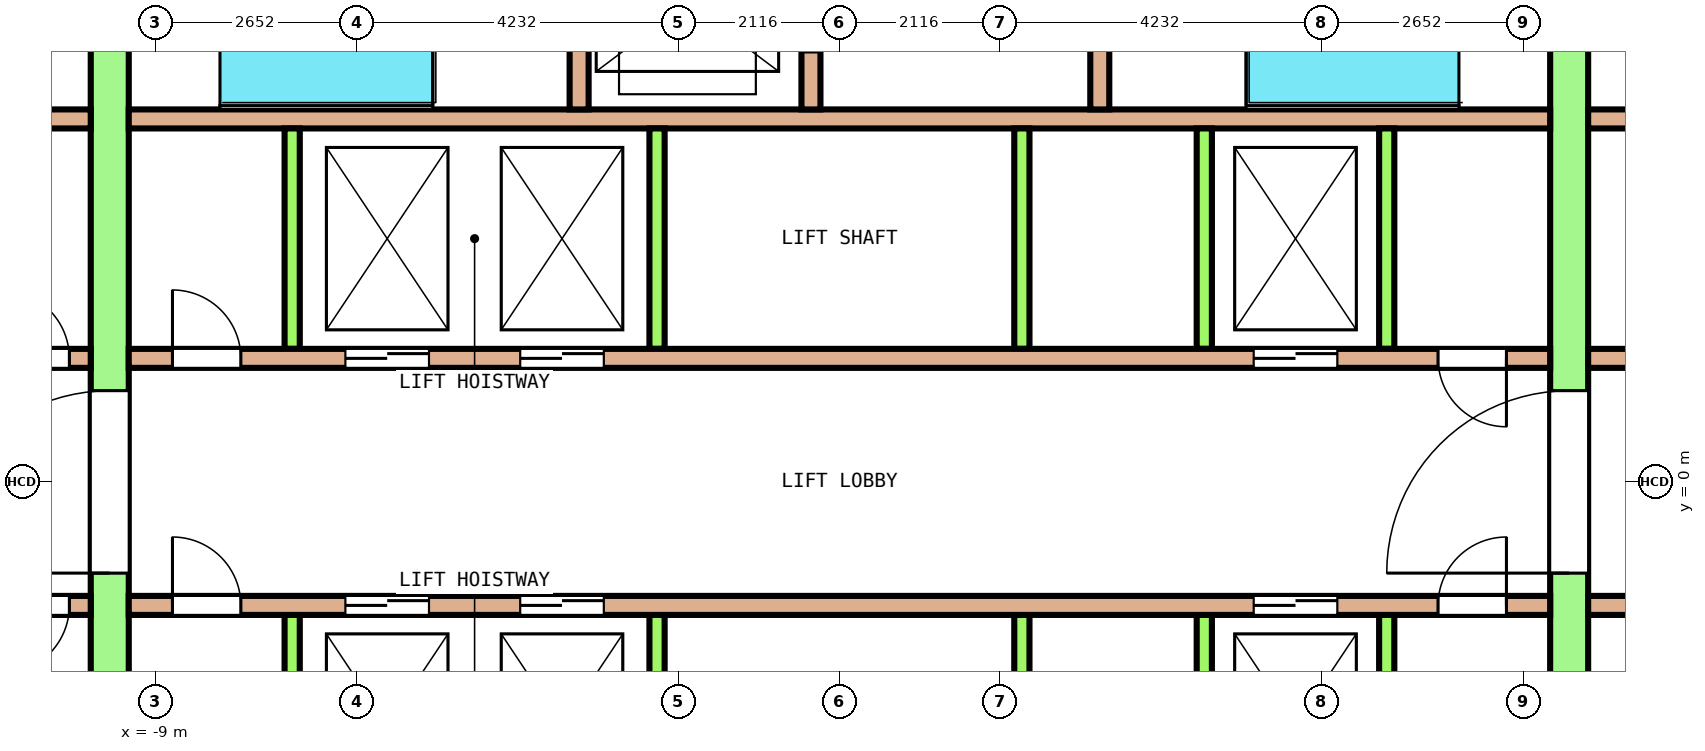
"""IFC4 building model, lengths in metres.
Left out: names, types, materials, properties, quantities, classifications, styles, units other than length and angle.
Written with IfcOpenShell. Run it as: python <this file> out.ifc"""

import sys

from ifc_helpers import new_model, si_unit, direction, frame, frame_2d, origin, place, context, subcontext, project, spatial, rectangle, extrude, element, fill, save


model = new_model("IFC4")
c1 = context("Model", 3, precision=1e-05, world=origin(), true_north=direction((0.0, 1.0)))
c2 = subcontext(c1, "Body", "Model", "MODEL_VIEW")
j1 = project(units=[si_unit("LENGTHUNIT", "METRE"), si_unit("PLANEANGLEUNIT", "RADIAN")], contexts=[c1])
p1 = place(None, origin())
s1 = spatial("IfcSite", under=j1, at=p1, CompositionType="ELEMENT")
p2 = place(p1, origin())
s2 = spatial("IfcBuilding", under=s1, at=p2, CompositionType="ELEMENT")
p3 = place(p2, frame((0.0, 0.0, 227.4)))
s3 = spatial("IfcBuildingStorey", under=s2, at=p3, CompositionType="ELEMENT", Elevation=227.4)
p4 = place(p3, frame((-9.6, -7.8, 0.0), z_axis=(0.0, 0.0, 1.0), x_axis=(0.0, 1.0, 0.0)))
e1 = element("IfcWall", 1, at=p4, inside=s3, PredefinedType="SHEAR", context=c2, shape_type="SweptSolid", body=[
    extrude(rectangle(XDim=15.6, YDim=0.5, at=frame_2d((7.8, 0.0))), origin(), (0.0, 0.0, 1.0), 3.7),
])
p5 = place(p4, frame((6.6, 0.0, 0.0)))
e2 = element("IfcOpeningElement", 2, at=p5, cuts=e1, PredefinedType="OPENING", context=c2, shape_type="SweptSolid", body=[
    extrude(rectangle(XDim=2.4, YDim=2.1, at=frame_2d((1.2, 1.05))), frame((0.0, 0.26, 0.0), z_axis=(0.0, -1.0, 0.0), x_axis=(1.0, 0.0, 0.0)), (0.0, 0.0, 1.0), 0.52),
])
p6 = place(p4, frame((13.5, 0.0, 0.0)))
e3 = element("IfcOpeningElement", 3, at=p6, cuts=e1, PredefinedType="OPENING", context=c2, shape_type="SweptSolid", body=[
    extrude(rectangle(XDim=1.2, YDim=2.1, at=frame_2d((0.6, 1.05))), frame((0.0, 0.26, 0.0), z_axis=(0.0, -1.0, 0.0), x_axis=(1.0, 0.0, 0.0)), (0.0, 0.0, 1.0), 0.52),
])
p7 = place(p4, frame((0.9, 0.0, 0.0)))
e4 = element("IfcOpeningElement", 4, at=p7, cuts=e1, PredefinedType="OPENING", context=c2, shape_type="SweptSolid", body=[
    extrude(rectangle(XDim=1.2, YDim=2.1, at=frame_2d((0.6, 1.05))), frame((0.0, 0.26, 0.0), z_axis=(0.0, -1.0, 0.0), x_axis=(1.0, 0.0, 0.0)), (0.0, 0.0, 1.0), 0.52),
])
p8 = place(p3, frame((9.6, -7.8, 0.0), z_axis=(0.0, 0.0, 1.0), x_axis=(0.0, 1.0, 0.0)))
e5 = element("IfcWall", 5, at=p8, inside=s3, PredefinedType="SHEAR", context=c2, shape_type="SweptSolid", body=[
    extrude(rectangle(XDim=15.6, YDim=0.5, at=frame_2d((7.8, 0.0))), origin(), (0.0, 0.0, 1.0), 3.7),
])
p9 = place(p8, frame((6.6, 0.0, 0.0)))
e6 = element("IfcOpeningElement", 6, at=p9, cuts=e5, PredefinedType="OPENING", context=c2, shape_type="SweptSolid", body=[
    extrude(rectangle(XDim=2.4, YDim=2.1, at=frame_2d((1.2, 1.05))), frame((0.0, 0.26, 0.0), z_axis=(0.0, -1.0, 0.0), x_axis=(1.0, 0.0, 0.0)), (0.0, 0.0, 1.0), 0.52),
])
p10 = place(p8, frame((13.5, 0.0, 0.0)))
e7 = element("IfcOpeningElement", 7, at=p10, cuts=e5, PredefinedType="OPENING", context=c2, shape_type="SweptSolid", body=[
    extrude(rectangle(XDim=1.2, YDim=2.1, at=frame_2d((0.6, 1.05))), frame((0.0, 0.26, 0.0), z_axis=(0.0, -1.0, 0.0), x_axis=(1.0, 0.0, 0.0)), (0.0, 0.0, 1.0), 0.52),
])
p11 = place(p8, frame((1.0, 0.0, 0.0)))
e8 = element("IfcOpeningElement", 8, at=p11, cuts=e5, PredefinedType="OPENING", context=c2, shape_type="SweptSolid", body=[
    extrude(rectangle(XDim=1.0, YDim=2.1, at=frame_2d((0.5, 1.05))), frame((0.0, 0.26, 0.0), z_axis=(0.0, -1.0, 0.0), x_axis=(1.0, 0.0, 0.0)), (0.0, 0.0, 1.0), 0.52),
])
p12 = place(p3, frame((-12.9, 1.625, 0.0), z_axis=(0.0, 0.0, 1.0), x_axis=(1.0, 0.0, 0.0)))
e9 = element("IfcWall", 9, at=p12, inside=s3, PredefinedType="SOLIDWALL", context=c2, shape_type="SweptSolid", body=[
    extrude(rectangle(XDim=3.05, YDim=0.25, at=frame_2d((1.525, 0.0))), origin(), (0.0, 0.0, 1.0), 3.7),
])
p13 = place(p12, frame((0.281, 0.0, 0.0)))
e10 = element("IfcOpeningElement", 10, at=p13, cuts=e9, PredefinedType="OPENING", context=c2, shape_type="SweptSolid", body=[
    extrude(rectangle(XDim=0.9, YDim=2.1, at=frame_2d((0.45, 1.05))), frame((0.0, 0.135, 0.0), z_axis=(0.0, -1.0, 0.0), x_axis=(1.0, 0.0, 0.0)), (0.0, 0.0, 1.0), 0.27),
])
p14 = place(p12, frame((1.869, 0.0, 0.0)))
e11 = element("IfcOpeningElement", 11, at=p14, cuts=e9, PredefinedType="OPENING", context=c2, shape_type="SweptSolid", body=[
    extrude(rectangle(XDim=0.9, YDim=2.1, at=frame_2d((0.45, 1.05))), frame((0.0, 0.135, 0.0), z_axis=(0.0, -1.0, 0.0), x_axis=(1.0, 0.0, 0.0)), (0.0, 0.0, 1.0), 0.27),
])
p15 = place(p3, frame((-9.35, 1.625, 0.0), z_axis=(0.0, 0.0, 1.0), x_axis=(1.0, 0.0, 0.0)))
e12 = element("IfcWall", 12, at=p15, inside=s3, PredefinedType="SOLIDWALL", context=c2, shape_type="SweptSolid", body=[
    extrude(rectangle(XDim=18.7, YDim=0.25, at=frame_2d((9.35, 0.0))), origin(), (0.0, 0.0, 1.0), 3.7),
])
p16 = place(p15, frame((2.85, 0.0, 0.0)))
e13 = element("IfcOpeningElement", 13, at=p16, cuts=e12, PredefinedType="OPENING", context=c2, shape_type="SweptSolid", body=[
    extrude(rectangle(XDim=1.1, YDim=2.1, at=frame_2d((0.55, 1.05))), frame((0.0, 0.135, 0.0), z_axis=(0.0, -1.0, 0.0), x_axis=(1.0, 0.0, 0.0)), (0.0, 0.0, 1.0), 0.27),
])
p17 = place(p15, frame((5.15, 0.0, 0.0)))
e14 = element("IfcOpeningElement", 14, at=p17, cuts=e12, PredefinedType="OPENING", context=c2, shape_type="SweptSolid", body=[
    extrude(rectangle(XDim=1.1, YDim=2.1, at=frame_2d((0.55, 1.05))), frame((0.0, 0.135, 0.0), z_axis=(0.0, -1.0, 0.0), x_axis=(1.0, 0.0, 0.0)), (0.0, 0.0, 1.0), 0.27),
])
p18 = place(p15, frame((14.8, 0.0, 0.0)))
e15 = element("IfcOpeningElement", 15, at=p18, cuts=e12, PredefinedType="OPENING", context=c2, shape_type="SweptSolid", body=[
    extrude(rectangle(XDim=1.1, YDim=2.1, at=frame_2d((0.55, 1.05))), frame((0.0, 0.135, 0.0), z_axis=(0.0, -1.0, 0.0), x_axis=(1.0, 0.0, 0.0)), (0.0, 0.0, 1.0), 0.27),
])
p19 = place(p15, frame((0.575, 0.0, 0.0)))
e16 = element("IfcOpeningElement", 16, at=p19, cuts=e12, PredefinedType="OPENING", context=c2, shape_type="SweptSolid", body=[
    extrude(rectangle(XDim=0.9, YDim=2.1, at=frame_2d((0.45, 1.05))), frame((0.0, 0.135, 0.0), z_axis=(0.0, -1.0, 0.0), x_axis=(1.0, 0.0, 0.0)), (0.0, 0.0, 1.0), 0.27),
])
p20 = place(p15, frame((17.225, 0.0, 0.0)))
e17 = element("IfcOpeningElement", 17, at=p20, cuts=e12, PredefinedType="OPENING", context=c2, shape_type="SweptSolid", body=[
    extrude(rectangle(XDim=0.9, YDim=2.1, at=frame_2d((0.45, 1.05))), frame((0.0, 0.135, 0.0), z_axis=(0.0, -1.0, 0.0), x_axis=(1.0, 0.0, 0.0)), (0.0, 0.0, 1.0), 0.27),
])
p21 = place(p3, frame((9.85, 1.625, 0.0), z_axis=(0.0, 0.0, 1.0), x_axis=(1.0, 0.0, 0.0)))
e18 = element("IfcWall", 18, at=p21, inside=s3, PredefinedType="SOLIDWALL", context=c2, shape_type="SweptSolid", body=[
    extrude(rectangle(XDim=3.05, YDim=0.25, at=frame_2d((1.525, 0.0))), origin(), (0.0, 0.0, 1.0), 3.7),
])
p22 = place(p21, frame((1.075, 0.0, 0.0)))
e19 = element("IfcOpeningElement", 19, at=p22, cuts=e18, PredefinedType="OPENING", context=c2, shape_type="SweptSolid", body=[
    extrude(rectangle(XDim=0.9, YDim=2.1, at=frame_2d((0.45, 1.05))), frame((0.0, 0.135, 0.0), z_axis=(0.0, -1.0, 0.0), x_axis=(1.0, 0.0, 0.0)), (0.0, 0.0, 1.0), 0.27),
])
p23 = place(p3, frame((-12.9, 4.775, 0.0), z_axis=(0.0, 0.0, 1.0), x_axis=(1.0, 0.0, 0.0)))
e20 = element("IfcWall", 20, at=p23, inside=s3, PredefinedType="SOLIDWALL", context=c2, shape_type="SweptSolid", body=[
    extrude(rectangle(XDim=3.05, YDim=0.25, at=frame_2d((1.525, 0.0))), origin(), (0.0, 0.0, 1.0), 3.7),
])
p24 = place(p3, frame((-9.35, 4.775, 0.0), z_axis=(0.0, 0.0, 1.0), x_axis=(1.0, 0.0, 0.0)))
e21 = element("IfcWall", 21, at=p24, inside=s3, PredefinedType="SOLIDWALL", context=c2, shape_type="SweptSolid", body=[
    extrude(rectangle(XDim=18.7, YDim=0.25, at=frame_2d((9.35, 0.0))), origin(), (0.0, 0.0, 1.0), 3.7),
])
p25 = place(p3, frame((9.85, 4.775, 0.0), z_axis=(0.0, 0.0, 1.0), x_axis=(1.0, 0.0, 0.0)))
e22 = element("IfcWall", 22, at=p25, inside=s3, PredefinedType="SOLIDWALL", context=c2, shape_type="SweptSolid", body=[
    extrude(rectangle(XDim=3.05, YDim=0.25, at=frame_2d((1.525, 0.0))), origin(), (0.0, 0.0, 1.0), 3.7),
])
for number, where, z_axis, x_axis in (
    (23, (-7.2, 1.75, 0.0), (0.0, 0.0, 1.0), (0.0, 1.0, 0.0)),
    (24, (-2.4, 1.75, 0.0), (0.0, 0.0, 1.0), (0.0, 1.0, 0.0)),
    (25, (2.4, 1.75, 0.0), (0.0, 0.0, 1.0), (0.0, 1.0, 0.0)),
    (26, (4.8, 1.75, 0.0), (0.0, 0.0, 1.0), (0.0, 1.0, 0.0)),
    (27, (7.2, 1.75, 0.0), (0.0, 0.0, 1.0), (0.0, 1.0, 0.0)),
):
    element("IfcWall", number, at=place(p3, frame(where, z_axis=z_axis, x_axis=x_axis)), inside=s3, PredefinedType="SOLIDWALL", context=c2, shape_type="SweptSolid", body=[
        extrude(rectangle(XDim=2.9, YDim=0.2, at=frame_2d((1.45, 0.0))), origin(), (0.0, 0.0, 1.0), 3.7),
    ])
p26 = place(p3, frame((-12.9, -1.625, 0.0), z_axis=(0.0, 0.0, 1.0), x_axis=(1.0, 0.0, 0.0)))
e28 = element("IfcWall", 28, at=p26, inside=s3, PredefinedType="SOLIDWALL", context=c2, shape_type="SweptSolid", body=[
    extrude(rectangle(XDim=3.05, YDim=0.25, at=frame_2d((1.525, 0.0))), origin(), (0.0, 0.0, 1.0), 3.7),
])
p27 = place(p26, frame((0.281, 0.0, 0.0)))
e29 = element("IfcOpeningElement", 29, at=p27, cuts=e28, PredefinedType="OPENING", context=c2, shape_type="SweptSolid", body=[
    extrude(rectangle(XDim=0.9, YDim=2.1, at=frame_2d((0.45, 1.05))), frame((0.0, 0.135, 0.0), z_axis=(0.0, -1.0, 0.0), x_axis=(1.0, 0.0, 0.0)), (0.0, 0.0, 1.0), 0.27),
])
p28 = place(p26, frame((1.869, 0.0, 0.0)))
e30 = element("IfcOpeningElement", 30, at=p28, cuts=e28, PredefinedType="OPENING", context=c2, shape_type="SweptSolid", body=[
    extrude(rectangle(XDim=0.9, YDim=2.1, at=frame_2d((0.45, 1.05))), frame((0.0, 0.135, 0.0), z_axis=(0.0, -1.0, 0.0), x_axis=(1.0, 0.0, 0.0)), (0.0, 0.0, 1.0), 0.27),
])
p29 = place(p3, frame((-9.35, -1.625, 0.0), z_axis=(0.0, 0.0, 1.0), x_axis=(1.0, 0.0, 0.0)))
e31 = element("IfcWall", 31, at=p29, inside=s3, PredefinedType="SOLIDWALL", context=c2, shape_type="SweptSolid", body=[
    extrude(rectangle(XDim=18.7, YDim=0.25, at=frame_2d((9.35, 0.0))), origin(), (0.0, 0.0, 1.0), 3.7),
])
p30 = place(p29, frame((2.85, 0.0, 0.0)))
e32 = element("IfcOpeningElement", 32, at=p30, cuts=e31, PredefinedType="OPENING", context=c2, shape_type="SweptSolid", body=[
    extrude(rectangle(XDim=1.1, YDim=2.1, at=frame_2d((0.55, 1.05))), frame((0.0, 0.135, 0.0), z_axis=(0.0, -1.0, 0.0), x_axis=(1.0, 0.0, 0.0)), (0.0, 0.0, 1.0), 0.27),
])
p31 = place(p29, frame((5.15, 0.0, 0.0)))
e33 = element("IfcOpeningElement", 33, at=p31, cuts=e31, PredefinedType="OPENING", context=c2, shape_type="SweptSolid", body=[
    extrude(rectangle(XDim=1.1, YDim=2.1, at=frame_2d((0.55, 1.05))), frame((0.0, 0.135, 0.0), z_axis=(0.0, -1.0, 0.0), x_axis=(1.0, 0.0, 0.0)), (0.0, 0.0, 1.0), 0.27),
])
p32 = place(p29, frame((14.8, 0.0, 0.0)))
e34 = element("IfcOpeningElement", 34, at=p32, cuts=e31, PredefinedType="OPENING", context=c2, shape_type="SweptSolid", body=[
    extrude(rectangle(XDim=1.1, YDim=2.1, at=frame_2d((0.55, 1.05))), frame((0.0, 0.135, 0.0), z_axis=(0.0, -1.0, 0.0), x_axis=(1.0, 0.0, 0.0)), (0.0, 0.0, 1.0), 0.27),
])
p33 = place(p29, frame((0.575, 0.0, 0.0)))
e35 = element("IfcOpeningElement", 35, at=p33, cuts=e31, PredefinedType="OPENING", context=c2, shape_type="SweptSolid", body=[
    extrude(rectangle(XDim=0.9, YDim=2.1, at=frame_2d((0.45, 1.05))), frame((0.0, 0.135, 0.0), z_axis=(0.0, -1.0, 0.0), x_axis=(1.0, 0.0, 0.0)), (0.0, 0.0, 1.0), 0.27),
])
p34 = place(p29, frame((17.225, 0.0, 0.0)))
e36 = element("IfcOpeningElement", 36, at=p34, cuts=e31, PredefinedType="OPENING", context=c2, shape_type="SweptSolid", body=[
    extrude(rectangle(XDim=0.9, YDim=2.1, at=frame_2d((0.45, 1.05))), frame((0.0, 0.135, 0.0), z_axis=(0.0, -1.0, 0.0), x_axis=(1.0, 0.0, 0.0)), (0.0, 0.0, 1.0), 0.27),
])
p35 = place(p3, frame((9.85, -1.625, 0.0), z_axis=(0.0, 0.0, 1.0), x_axis=(1.0, 0.0, 0.0)))
e37 = element("IfcWall", 37, at=p35, inside=s3, PredefinedType="SOLIDWALL", context=c2, shape_type="SweptSolid", body=[
    extrude(rectangle(XDim=3.05, YDim=0.25, at=frame_2d((1.525, 0.0))), origin(), (0.0, 0.0, 1.0), 3.7),
])
p36 = place(p35, frame((1.075, 0.0, 0.0)))
e38 = element("IfcOpeningElement", 38, at=p36, cuts=e37, PredefinedType="OPENING", context=c2, shape_type="SweptSolid", body=[
    extrude(rectangle(XDim=0.9, YDim=2.1, at=frame_2d((0.45, 1.05))), frame((0.0, 0.135, 0.0), z_axis=(0.0, -1.0, 0.0), x_axis=(1.0, 0.0, 0.0)), (0.0, 0.0, 1.0), 0.27),
])
for number, where, z_axis, x_axis in (
    (39, (-7.2, -4.65, 0.0), (0.0, 0.0, 1.0), (0.0, 1.0, 0.0)),
    (40, (-2.4, -4.65, 0.0), (0.0, 0.0, 1.0), (0.0, 1.0, 0.0)),
    (41, (2.4, -4.65, 0.0), (0.0, 0.0, 1.0), (0.0, 1.0, 0.0)),
    (42, (4.8, -4.65, 0.0), (0.0, 0.0, 1.0), (0.0, 1.0, 0.0)),
    (43, (7.2, -4.65, 0.0), (0.0, 0.0, 1.0), (0.0, 1.0, 0.0)),
):
    element("IfcWall", number, at=place(p3, frame(where, z_axis=z_axis, x_axis=x_axis)), inside=s3, PredefinedType="SOLIDWALL", context=c2, shape_type="SweptSolid", body=[
        extrude(rectangle(XDim=2.9, YDim=0.2, at=frame_2d((1.45, 0.0))), origin(), (0.0, 0.0, 1.0), 3.7),
    ])
p37 = place(p3, frame((-3.425, 4.9, 0.0), z_axis=(0.0, 0.0, 1.0), x_axis=(0.0, 1.0, 0.0)))
e44 = element("IfcWall", 44, at=p37, inside=s3, PredefinedType="SOLIDWALL", context=c2, shape_type="SweptSolid", body=[
    extrude(rectangle(XDim=2.9, YDim=0.25, at=frame_2d((1.45, 0.0))), origin(), (0.0, 0.0, 1.0), 3.7),
])
p38 = place(p3, frame((-0.375, 4.9, 0.0), z_axis=(0.0, 0.0, 1.0), x_axis=(0.0, 1.0, 0.0)))
e45 = element("IfcWall", 45, at=p38, inside=s3, PredefinedType="SOLIDWALL", context=c2, shape_type="SweptSolid", body=[
    extrude(rectangle(XDim=2.9, YDim=0.25, at=frame_2d((1.45, 0.0))), origin(), (0.0, 0.0, 1.0), 3.7),
])
p39 = place(p38, frame((0.75, 0.0, 0.0)))
e46 = element("IfcOpeningElement", 46, at=p39, cuts=e45, PredefinedType="OPENING", context=c2, shape_type="SweptSolid", body=[
    extrude(rectangle(XDim=1.4, YDim=2.1, at=frame_2d((0.7, 1.05))), frame((0.0, 0.135, 0.0), z_axis=(0.0, -1.0, 0.0), x_axis=(1.0, 0.0, 0.0)), (0.0, 0.0, 1.0), 0.27),
])
p40 = place(p3, frame((3.425, 4.9, 0.0), z_axis=(0.0, 0.0, 1.0), x_axis=(0.0, 1.0, 0.0)))
e47 = element("IfcWall", 47, at=p40, inside=s3, PredefinedType="SOLIDWALL", context=c2, shape_type="SweptSolid", body=[
    extrude(rectangle(XDim=2.9, YDim=0.25, at=frame_2d((1.45, 0.0))), origin(), (0.0, 0.0, 1.0), 3.7),
])
p41 = place(p16, origin())
e48 = element("IfcDoor", 48, at=p41, inside=s3, OperationType="DOUBLE_DOOR_SLIDING", PredefinedType="DOOR", context=c2, shape_type="SweptSolid", body=[
    extrude(rectangle(XDim=1.1, YDim=2.1, at=frame_2d((0.55, 1.05))), frame((0.0, 0.075, 0.0), z_axis=(0.0, -1.0, 0.0), x_axis=(1.0, 0.0, 0.0)), (0.0, 0.0, 1.0), 0.15),
])
fill(e13, e48)
p42 = place(p17, origin())
e49 = element("IfcDoor", 49, at=p42, inside=s3, OperationType="DOUBLE_DOOR_SLIDING", PredefinedType="DOOR", context=c2, shape_type="SweptSolid", body=[
    extrude(rectangle(XDim=1.1, YDim=2.1, at=frame_2d((0.55, 1.05))), frame((0.0, 0.075, 0.0), z_axis=(0.0, -1.0, 0.0), x_axis=(1.0, 0.0, 0.0)), (0.0, 0.0, 1.0), 0.15),
])
fill(e14, e49)
p43 = place(p18, origin())
e50 = element("IfcDoor", 50, at=p43, inside=s3, OperationType="DOUBLE_DOOR_SLIDING", PredefinedType="DOOR", context=c2, shape_type="SweptSolid", body=[
    extrude(rectangle(XDim=1.1, YDim=2.1, at=frame_2d((0.55, 1.05))), frame((0.0, 0.075, 0.0), z_axis=(0.0, -1.0, 0.0), x_axis=(1.0, 0.0, 0.0)), (0.0, 0.0, 1.0), 0.15),
])
fill(e15, e50)
p44 = place(p30, origin())
e51 = element("IfcDoor", 51, at=p44, inside=s3, OperationType="DOUBLE_DOOR_SLIDING", PredefinedType="DOOR", context=c2, shape_type="SweptSolid", body=[
    extrude(rectangle(XDim=1.1, YDim=2.1, at=frame_2d((0.55, 1.05))), frame((0.0, 0.075, 0.0), z_axis=(0.0, -1.0, 0.0), x_axis=(1.0, 0.0, 0.0)), (0.0, 0.0, 1.0), 0.15),
])
fill(e32, e51)
p45 = place(p31, origin())
e52 = element("IfcDoor", 52, at=p45, inside=s3, OperationType="DOUBLE_DOOR_SLIDING", PredefinedType="DOOR", context=c2, shape_type="SweptSolid", body=[
    extrude(rectangle(XDim=1.1, YDim=2.1, at=frame_2d((0.55, 1.05))), frame((0.0, 0.075, 0.0), z_axis=(0.0, -1.0, 0.0), x_axis=(1.0, 0.0, 0.0)), (0.0, 0.0, 1.0), 0.15),
])
fill(e33, e52)
p46 = place(p32, origin())
e53 = element("IfcDoor", 53, at=p46, inside=s3, OperationType="DOUBLE_DOOR_SLIDING", PredefinedType="DOOR", context=c2, shape_type="SweptSolid", body=[
    extrude(rectangle(XDim=1.1, YDim=2.1, at=frame_2d((0.55, 1.05))), frame((0.0, 0.075, 0.0), z_axis=(0.0, -1.0, 0.0), x_axis=(1.0, 0.0, 0.0)), (0.0, 0.0, 1.0), 0.15),
])
fill(e34, e53)
p47 = place(p5, origin())
e54 = element("IfcDoor", 54, at=p47, inside=s3, OperationType="DOUBLE_DOOR_SINGLE_SWING", PredefinedType="DOOR", context=c2, shape_type="SweptSolid", body=[
    extrude(rectangle(XDim=2.4, YDim=2.1, at=frame_2d((1.2, 1.05))), frame((0.0, 0.2, 0.0), z_axis=(0.0, -1.0, 0.0), x_axis=(1.0, 0.0, 0.0)), (0.0, 0.0, 1.0), 0.4),
])
fill(e2, e54)
p48 = place(p9, origin())
e55 = element("IfcDoor", 55, at=p48, inside=s3, OperationType="DOUBLE_DOOR_SINGLE_SWING", PredefinedType="DOOR", context=c2, shape_type="SweptSolid", body=[
    extrude(rectangle(XDim=2.4, YDim=2.1, at=frame_2d((1.2, 1.05))), frame((0.0, 0.2, 0.0), z_axis=(0.0, -1.0, 0.0), x_axis=(1.0, 0.0, 0.0)), (0.0, 0.0, 1.0), 0.4),
])
fill(e6, e55)
p49 = place(p14, origin())
e56 = element("IfcDoor", 56, at=p49, inside=s3, OperationType="SINGLE_SWING_LEFT", PredefinedType="DOOR", context=c2, shape_type="SweptSolid", body=[
    extrude(rectangle(XDim=0.9, YDim=2.1, at=frame_2d((0.45, 1.05))), frame((0.0, 0.075, 0.0), z_axis=(0.0, -1.0, 0.0), x_axis=(1.0, 0.0, 0.0)), (0.0, 0.0, 1.0), 0.15),
])
fill(e11, e56)
p50 = place(p19, origin())
e57 = element("IfcDoor", 57, at=p50, inside=s3, OperationType="SINGLE_SWING_RIGHT", PredefinedType="DOOR", context=c2, shape_type="SweptSolid", body=[
    extrude(rectangle(XDim=0.9, YDim=2.1, at=frame_2d((0.45, 1.05))), frame((0.0, 0.075, 0.0), z_axis=(0.0, -1.0, 0.0), x_axis=(1.0, 0.0, 0.0)), (0.0, 0.0, 1.0), 0.15),
])
fill(e16, e57)
p51 = place(p20, origin())
e58 = element("IfcDoor", 58, at=p51, inside=s3, OperationType="SINGLE_SWING_LEFT", PredefinedType="DOOR", context=c2, shape_type="SweptSolid", body=[
    extrude(rectangle(XDim=0.9, YDim=2.1, at=frame_2d((0.45, 1.05))), frame((0.0, 0.075, 0.0), z_axis=(0.0, -1.0, 0.0), x_axis=(1.0, 0.0, 0.0)), (0.0, 0.0, 1.0), 0.15),
])
fill(e17, e58)
p52 = place(p28, origin())
e59 = element("IfcDoor", 59, at=p52, inside=s3, OperationType="SINGLE_SWING_RIGHT", PredefinedType="DOOR", context=c2, shape_type="SweptSolid", body=[
    extrude(rectangle(XDim=0.9, YDim=2.1, at=frame_2d((0.45, 1.05))), frame((0.0, 0.075, 0.0), z_axis=(0.0, -1.0, 0.0), x_axis=(1.0, 0.0, 0.0)), (0.0, 0.0, 1.0), 0.15),
])
fill(e30, e59)
p53 = place(p33, origin())
e60 = element("IfcDoor", 60, at=p53, inside=s3, OperationType="SINGLE_SWING_LEFT", PredefinedType="DOOR", context=c2, shape_type="SweptSolid", body=[
    extrude(rectangle(XDim=0.9, YDim=2.1, at=frame_2d((0.45, 1.05))), frame((0.0, 0.075, 0.0), z_axis=(0.0, -1.0, 0.0), x_axis=(1.0, 0.0, 0.0)), (0.0, 0.0, 1.0), 0.15),
])
fill(e35, e60)
p54 = place(p34, origin())
e61 = element("IfcDoor", 61, at=p54, inside=s3, OperationType="SINGLE_SWING_RIGHT", PredefinedType="DOOR", context=c2, shape_type="SweptSolid", body=[
    extrude(rectangle(XDim=0.9, YDim=2.1, at=frame_2d((0.45, 1.05))), frame((0.0, 0.075, 0.0), z_axis=(0.0, -1.0, 0.0), x_axis=(1.0, 0.0, 0.0)), (0.0, 0.0, 1.0), 0.15),
])
fill(e36, e61)
save(model, sys.argv[1])
